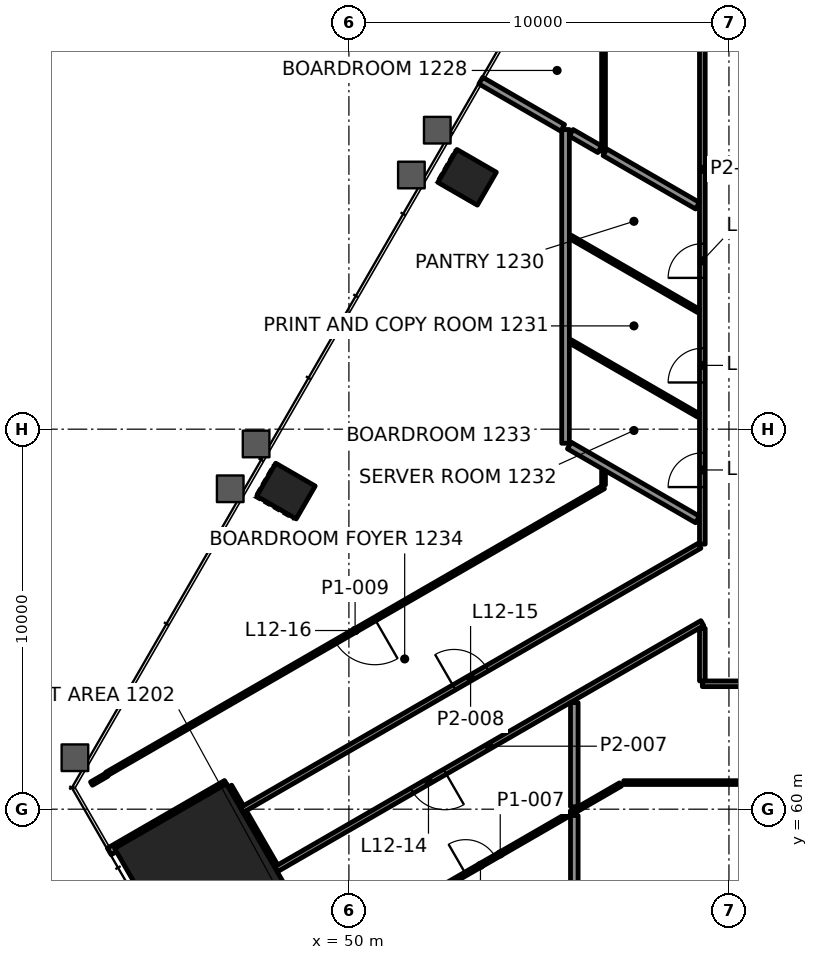
"""IFC4 building model, lengths in metres.
Left out: names, types, materials, properties, quantities, classifications, styles, units other than length and angle.
Written with IfcOpenShell. Run it as: python <this file> out.ifc"""

import sys

from ifc_helpers import new_model, si_unit, direction, frame, frame_2d, origin, origin_2d, place, context, subcontext, project, spatial, rectangle, extrude, element, fill, save


model = new_model("IFC4")
c1 = context("Model", 3, precision=1e-05, world=origin(), true_north=direction((0.0, 1.0)))
c2 = subcontext(c1, "Body", "Model", "MODEL_VIEW")
j1 = project(units=[si_unit("LENGTHUNIT", "METRE"), si_unit("PLANEANGLEUNIT", "RADIAN")], contexts=[c1])
p1 = place(None, origin())
s1 = spatial("IfcSite", under=j1, at=p1, CompositionType="ELEMENT")
p2 = place(p1, origin())
s2 = spatial("IfcBuilding", under=s1, at=p2, CompositionType="ELEMENT")
p3 = place(p2, frame((0.0, 0.0, 56.8)))
s3 = spatial("IfcBuildingStorey", under=s2, at=p3, CompositionType="ELEMENT", Elevation=56.8)
p4 = place(p3, frame((46.156, 58.347, 0.0), z_axis=(0.0, 0.0, 1.0), x_axis=(0.5, -0.866025403784, 0.0)))
e1 = element("IfcColumn", 1, at=p4, inside=s3, PredefinedType="COLUMN", context=c2, shape_type="SweptSolid", body=[
    extrude(rectangle(XDim=3.4, YDim=3.4, at=origin_2d()), origin(), (0.0, 0.0, 1.0), 4.2),
])
for number, where, z_axis, x_axis in (
    (2, (53.111, 76.628, -0.0), (0.0, 0.0, 1.0), (-0.5, -0.866, 0.0)),
    (3, (48.343, 68.371, -0.0), (0.0, 0.0, 1.0), (-0.5, -0.866, 0.0)),
):
    element("IfcColumn", number, at=place(p3, frame(where, z_axis=z_axis, x_axis=x_axis)), inside=s3, PredefinedType="COLUMN", context=c2, shape_type="SweptSolid", body=[
        extrude(rectangle(XDim=1.0, YDim=1.2, at=origin_2d()), origin(), (0.0, 0.0, 1.0), 4.2),
    ])
p5 = place(p3, frame((57.232, 60.7, 0.0), z_axis=(0.0, 0.0, 1.0), x_axis=(1.0, 0.0, 0.0)))
e4 = element("IfcWall", 4, at=p5, inside=s3, PredefinedType="PARTITIONING", context=c2, shape_type="SweptSolid", body=[
    extrude(rectangle(XDim=15.385, YDim=0.1, at=frame_2d((7.692, 0.0))), origin(), (0.0, 0.0, 1.0), 3.4),
])
p6 = place(p5, frame((7.192, 0.0, 0.0)))
e5 = element("IfcOpeningElement", 5, at=p6, cuts=e4, PredefinedType="OPENING", context=c2, shape_type="SweptSolid", body=[
    extrude(rectangle(XDim=1.0, YDim=2.1, at=frame_2d((0.5, 1.05))), frame((0.0, 0.06, 0.0), z_axis=(0.0, -1.0, 0.0), x_axis=(1.0, 0.0, 0.0)), (0.0, 0.0, 1.0), 0.12),
])
p7 = place(p3, frame((90.699, 63.3, 0.0), z_axis=(0.0, 0.0, 1.0), x_axis=(-1.0, 0.0, 0.0)))
e6 = element("IfcWall", 6, at=p7, inside=s3, PredefinedType="PARTITIONING", context=c2, shape_type="SweptSolid", body=[
    extrude(rectangle(XDim=31.399, YDim=0.15, at=frame_2d((15.7, 0.0))), origin(), (0.0, 0.0, 1.0), 3.4),
])
p8 = place(p7, frame((4.968, 0.0, 0.0)))
e7 = element("IfcOpeningElement", 7, at=p8, cuts=e6, PredefinedType="OPENING", context=c2, shape_type="SweptSolid", body=[
    extrude(rectangle(XDim=1.2, YDim=2.1, at=frame_2d((0.6, 1.05))), frame((0.0, 0.085, 0.0), z_axis=(0.0, -1.0, 0.0), x_axis=(1.0, 0.0, 0.0)), (0.0, 0.0, 1.0), 0.17),
])
p9 = place(p7, frame((13.908, 0.0, 0.0)))
e8 = element("IfcOpeningElement", 8, at=p9, cuts=e6, PredefinedType="OPENING", context=c2, shape_type="SweptSolid", body=[
    extrude(rectangle(XDim=1.2, YDim=2.1, at=frame_2d((0.6, 1.05))), frame((0.0, 0.085, 0.0), z_axis=(0.0, -1.0, 0.0), x_axis=(1.0, 0.0, 0.0)), (0.0, 0.0, 1.0), 0.17),
])
p10 = place(p7, frame((24.14, 0.0, 0.0)))
e9 = element("IfcOpeningElement", 9, at=p10, cuts=e6, PredefinedType="OPENING", context=c2, shape_type="SweptSolid", body=[
    extrude(rectangle(XDim=1.0, YDim=2.1, at=frame_2d((0.5, 1.05))), frame((0.0, 0.085, 0.0), z_axis=(0.0, -1.0, 0.0), x_axis=(1.0, 0.0, 0.0)), (0.0, 0.0, 1.0), 0.17),
])
p11 = place(p3, frame((50.819, 56.998, 0.0), z_axis=(0.0, 0.0, 1.0), x_axis=(0.866023631393, 0.50000306986, 0.0)))
e10 = element("IfcWall", 10, at=p11, inside=s3, PredefinedType="PARTITIONING", context=c2, shape_type="SweptSolid", body=[
    extrude(rectangle(XDim=7.305, YDim=0.1, at=frame_2d((3.653, 0.0))), origin(), (0.0, 0.0, 1.0), 3.4),
])
p12 = place(p11, frame((2.602, 0.0, 0.0)))
e11 = element("IfcOpeningElement", 11, at=p12, cuts=e10, PredefinedType="OPENING", context=c2, shape_type="SweptSolid", body=[
    extrude(rectangle(XDim=0.9, YDim=2.1, at=frame_2d((0.45, 1.05))), frame((0.0, 0.06, 0.0), z_axis=(0.0, -1.0, 0.0), x_axis=(1.0, 0.0, 0.0)), (0.0, 0.0, 1.0), 0.12),
])
p13 = place(p3, frame((59.3, 64.896, 0.0), z_axis=(0.0, 0.0, 1.0), x_axis=(-0.86602302899, -0.500004113243, 0.0)))
e12 = element("IfcWall", 12, at=p13, inside=s3, PredefinedType="PARTITIONING", context=c2, shape_type="SweptSolid", body=[
    extrude(rectangle(XDim=12.956, YDim=0.15, at=frame_2d((6.478, 0.0))), origin(), (0.0, 0.0, 1.0), 3.247),
])
p14 = place(p13, frame((7.821, 0.0, 0.0)))
e13 = element("IfcOpeningElement", 13, at=p14, cuts=e12, PredefinedType="OPENING", context=c2, shape_type="SweptSolid", body=[
    extrude(rectangle(XDim=1.0, YDim=2.1, at=frame_2d((0.5, 1.05))), frame((0.0, 0.085, 0.0), z_axis=(0.0, -1.0, 0.0), x_axis=(1.0, 0.0, 0.0)), (0.0, 0.0, 1.0), 0.17),
])
p15 = place(p3, frame((47.178, 59.976, 0.0), z_axis=(0.0, 0.0, 1.0), x_axis=(0.866019280802, 0.500010605167, 0.0)))
e14 = element("IfcWall", 14, at=p15, inside=s3, PredefinedType="PARTITIONING", context=c2, shape_type="SweptSolid", body=[
    extrude(rectangle(XDim=13.91, YDim=0.15, at=frame_2d((6.955, 0.0))), origin(), (0.0, 0.0, 1.0), 3.4),
])
p16 = place(p15, frame((6.455, 0.0, 0.0)))
e15 = element("IfcOpeningElement", 15, at=p16, cuts=e14, PredefinedType="OPENING", context=c2, shape_type="SweptSolid", body=[
    extrude(rectangle(XDim=1.0, YDim=2.1, at=frame_2d((0.5, 1.05))), frame((0.0, 0.085, 0.0), z_axis=(0.0, -1.0, 0.0), x_axis=(1.0, 0.0, 0.0)), (0.0, 0.0, 1.0), 0.17),
])
p17 = place(p3, frame((43.695, 58.888, 0.0), z_axis=(0.0, 0.0, 1.0), x_axis=(0.866031398331, 0.499989616998, 0.0)))
e16 = element("IfcWall", 16, at=p17, inside=s3, PredefinedType="PARTITIONING", context=c2, shape_type="SweptSolid", body=[
    extrude(rectangle(XDim=3.56, YDim=0.2, at=frame_2d((1.78, 0.0))), origin(), (0.0, 0.0, 1.0), 3.4),
])
p18 = place(p3, frame((43.226, 60.674, 0.0), z_axis=(0.0, 0.0, 1.0), x_axis=(0.866073792734, 0.499916178513, 0.0)))
e17 = element("IfcWall", 17, at=p18, inside=s3, PredefinedType="PARTITIONING", context=c2, shape_type="SweptSolid", body=[
    extrude(rectangle(XDim=0.473, YDim=0.1, at=frame_2d((0.236, 0.0))), origin(), (0.0, 0.0, 1.0), 3.4),
])
p19 = place(p3, frame((56.7, 68.476, 0.0), z_axis=(0.0, 0.0, 1.0), x_axis=(-0.866026152489, -0.499998703203, 0.0)))
e18 = element("IfcWall", 18, at=p19, inside=s3, PredefinedType="PARTITIONING", context=c2, shape_type="SweptSolid", body=[
    extrude(rectangle(XDim=15.096, YDim=0.1, at=frame_2d((7.548, 0.0))), origin(), (0.0, 0.0, 1.0), 3.4),
])
p20 = place(p19, frame((6.948, 0.0, 0.0)))
e19 = element("IfcOpeningElement", 19, at=p20, cuts=e18, PredefinedType="OPENING", context=c2, shape_type="SweptSolid", body=[
    extrude(rectangle(XDim=1.2, YDim=2.1, at=frame_2d((0.6, 1.05))), frame((0.0, 0.06, 0.0), z_axis=(0.0, -1.0, 0.0), x_axis=(1.0, 0.0, 0.0)), (0.0, 0.0, 1.0), 0.12),
])
p21 = place(p3, frame((59.3, 63.375, 0.0), z_axis=(0.0, 0.0, 1.0), x_axis=(0.0, 1.0, 0.0)))
e20 = element("IfcWall", 20, at=p21, inside=s3, PredefinedType="PARTITIONING", context=c2, shape_type="SweptSolid", body=[
    extrude(rectangle(XDim=1.385, YDim=0.15, at=frame_2d((0.692, 0.0))), origin(), (0.0, 0.0, 1.0), 3.247),
])
p22 = place(p3, frame((59.3, 66.975, 0.0), z_axis=(0.0, 0.0, 1.0), x_axis=(0.0, 1.0, 0.0)))
e21 = element("IfcWall", 21, at=p22, inside=s3, PredefinedType="PARTITIONING", context=c2, shape_type="SweptSolid", body=[
    extrude(rectangle(XDim=19.725, YDim=0.15, at=frame_2d((9.862, 0.0))), origin(), (0.0, 0.0, 1.0), 3.4),
])
p23 = place(p22, frame((1.502, 0.0, 0.0)))
e22 = element("IfcOpeningElement", 22, at=p23, cuts=e21, PredefinedType="OPENING", context=c2, shape_type="SweptSolid", body=[
    extrude(rectangle(XDim=0.9, YDim=2.1, at=frame_2d((0.45, 1.05))), frame((0.0, 0.085, 0.0), z_axis=(0.0, -1.0, 0.0), x_axis=(1.0, 0.0, 0.0)), (0.0, 0.0, 1.0), 0.17),
])
p24 = place(p22, frame((4.254, 0.0, 0.0)))
e23 = element("IfcOpeningElement", 23, at=p24, cuts=e21, PredefinedType="OPENING", context=c2, shape_type="SweptSolid", body=[
    extrude(rectangle(XDim=0.9, YDim=2.1, at=frame_2d((0.45, 1.05))), frame((0.0, 0.085, 0.0), z_axis=(0.0, -1.0, 0.0), x_axis=(1.0, 0.0, 0.0)), (0.0, 0.0, 1.0), 0.17),
])
p25 = place(p22, frame((7.007, 0.0, 0.0)))
e24 = element("IfcOpeningElement", 24, at=p25, cuts=e21, PredefinedType="OPENING", context=c2, shape_type="SweptSolid", body=[
    extrude(rectangle(XDim=0.9, YDim=2.1, at=frame_2d((0.45, 1.05))), frame((0.0, 0.085, 0.0), z_axis=(0.0, -1.0, 0.0), x_axis=(1.0, 0.0, 0.0)), (0.0, 0.0, 1.0), 0.17),
])
p26 = place(p3, frame((56.7, 68.534, 0.0), z_axis=(0.0, 0.0, 1.0), x_axis=(0.0, 1.0, 0.0)))
e25 = element("IfcWall", 25, at=p26, inside=s3, PredefinedType="PARTITIONING", context=c2, shape_type="SweptSolid", body=[
    extrude(rectangle(XDim=0.372, YDim=0.1, at=frame_2d((0.186, 0.0))), origin(), (0.0, 0.0, 1.0), 3.4),
])
p27 = place(p3, frame((56.7, 84.046, 0.0), z_axis=(0.0, 0.0, 1.0), x_axis=(0.0, -1.0, 0.0)))
e26 = element("IfcWall", 26, at=p27, inside=s3, PredefinedType="PARTITIONING", context=c2, shape_type="SweptSolid", body=[
    extrude(rectangle(XDim=6.737, YDim=0.1, at=frame_2d((3.369, 0.0))), origin(), (0.0, 0.0, 1.0), 3.165),
])
p28 = place(p27, frame((2.769, 0.0, 0.0)))
e27 = element("IfcOpeningElement", 27, at=p28, cuts=e26, PredefinedType="OPENING", context=c2, shape_type="SweptSolid", body=[
    extrude(rectangle(XDim=1.2, YDim=2.1, at=frame_2d((0.6, 1.05))), frame((0.0, 0.06, 0.0), z_axis=(0.0, -1.0, 0.0), x_axis=(1.0, 0.0, 0.0)), (0.0, 0.0, 1.0), 0.12),
])
p29 = place(p3, frame((55.931, 55.829, 0.0), z_axis=(0.0, 0.0, 1.0), x_axis=(0.0, 1.0, 0.0)))
e28 = element("IfcWall", 28, at=p29, inside=s3, PredefinedType="PARTITIONING", context=c2, shape_type="SweptSolid", body=[
    extrude(rectangle(XDim=4.005, YDim=0.2, at=frame_2d((2.002, 0.0))), origin(), (0.0, 0.0, 1.0), 3.4),
])
p30 = place(p3, frame((55.7, 69.63, 0.0), z_axis=(0.0, 0.0, 1.0), x_axis=(0.0, 1.0, 0.0)))
e29 = element("IfcWall", 29, at=p30, inside=s3, PredefinedType="PARTITIONING", context=c2, shape_type="SweptSolid", body=[
    extrude(rectangle(XDim=8.256, YDim=0.2, at=frame_2d((4.128, 0.0))), origin(), (0.0, 0.0, 1.0), 3.4),
])
p31 = place(p3, frame((48.039, 58.485, 0.0), z_axis=(0.0, 0.0, 1.0), x_axis=(-0.499949127178, 0.86605477323, 0.0)))
e30 = element("IfcWall", 30, at=p31, inside=s3, PredefinedType="PARTITIONING", context=c2, shape_type="SweptSolid", body=[
    extrude(rectangle(XDim=1.647, YDim=0.2, at=frame_2d((0.824, 0.0))), origin(), (0.0, 0.0, 1.0), 3.247),
])
p32 = place(p3, frame((59.173, 75.881, 0.0), z_axis=(0.0, 0.0, 1.0), x_axis=(-0.866049697453, 0.499957919771, 0.0)))
e31 = element("IfcWall", 31, at=p32, inside=s3, PredefinedType="PARTITIONING", context=c2, shape_type="SweptSolid", body=[
    extrude(rectangle(XDim=2.812, YDim=0.2, at=frame_2d((1.406, 0.0))), origin(), (0.0, 0.0, 1.0), 3.4),
])
p33 = place(p3, frame((59.199, 73.113, 0.0), z_axis=(0.0, 0.0, 1.0), x_axis=(-0.866016482536, 0.500015451737, 0.0)))
e32 = element("IfcWall", 32, at=p33, inside=s3, PredefinedType="PARTITIONING", context=c2, shape_type="SweptSolid", body=[
    extrude(rectangle(XDim=3.895, YDim=0.1, at=frame_2d((1.948, 0.0))), origin(), (0.0, 0.0, 1.0), 3.4),
])
p34 = place(p3, frame((59.199, 70.361, 0.0), z_axis=(0.0, 0.0, 1.0), x_axis=(-0.866043624834, 0.499968438888, 0.0)))
e33 = element("IfcWall", 33, at=p34, inside=s3, PredefinedType="PARTITIONING", context=c2, shape_type="SweptSolid", body=[
    extrude(rectangle(XDim=3.895, YDim=0.1, at=frame_2d((1.947, 0.0))), origin(), (0.0, 0.0, 1.0), 3.4),
])
p35 = place(p3, frame((59.173, 67.623, 0.0), z_axis=(0.0, 0.0, 1.0), x_axis=(-0.866000809756, 0.500042595688, 0.0)))
e34 = element("IfcWall", 34, at=p35, inside=s3, PredefinedType="PARTITIONING", context=c2, shape_type="SweptSolid", body=[
    extrude(rectangle(XDim=3.895, YDim=0.2, at=frame_2d((1.947, 0.0))), origin(), (0.0, 0.0, 1.0), 3.4),
])
p36 = place(p3, frame((55.931, 60.065, 0.0), z_axis=(0.0, 0.0, 1.0), x_axis=(0.0, 1.0, 0.0)))
e35 = element("IfcWall", 35, at=p36, inside=s3, PredefinedType="PARTITIONING", context=c2, shape_type="SweptSolid", body=[
    extrude(rectangle(XDim=2.74, YDim=0.2, at=frame_2d((1.37, 0.0))), origin(), (0.0, 0.0, 1.0), 3.4),
])
p37 = place(p3, frame((47.14, 60.041, 0.0), z_axis=(0.0, 0.0, 1.0), x_axis=(-0.500049599607, 0.865996765544, 0.0)))
e36 = element("IfcWall", 36, at=p37, inside=s3, PredefinedType="PARTITIONING", context=c2, shape_type="SweptSolid", body=[
    extrude(rectangle(XDim=0.625, YDim=0.2, at=frame_2d((0.312, 0.0))), origin(), (0.0, 0.0, 1.0), 3.4),
])
p38 = place(p3, frame((56.6, 77.366, 0.0), z_axis=(0.0, 0.0, 1.0), x_axis=(-0.866101087359, 0.499868889286, 0.0)))
e37 = element("IfcWall", 37, at=p38, inside=s3, PredefinedType="PARTITIONING", context=c2, shape_type="SweptSolid", body=[
    extrude(rectangle(XDim=0.866, YDim=0.2, at=frame_2d((0.433, 0.0))), origin(), (0.0, 0.0, 1.0), 3.4),
])
p39 = place(p3, frame((55.625, 77.929, 0.0), z_axis=(0.0, 0.0, 1.0), x_axis=(-0.86602376425, 0.500002839747, 0.0)))
e38 = element("IfcWall", 38, at=p39, inside=s3, PredefinedType="PARTITIONING", context=c2, shape_type="SweptSolid", body=[
    extrude(rectangle(XDim=2.487, YDim=0.2, at=frame_2d((1.244, 0.0))), origin(), (0.0, 0.0, 1.0), 3.165),
])
p40 = place(p12, origin())
e39 = element("IfcDoor", 39, at=p40, inside=s3, OperationType="SINGLE_SWING_RIGHT", PredefinedType="DOOR", context=c2, shape_type="SweptSolid", body=[
    extrude(rectangle(XDim=0.9, YDim=2.1, at=frame_2d((0.45, 1.05))), frame((0.0, 0.025, 0.0), z_axis=(0.0, -1.0, 0.0), x_axis=(1.0, 0.0, 0.0)), (0.0, 0.0, 1.0), 0.05),
])
fill(e11, e39)
p41 = place(p14, origin())
e40 = element("IfcDoor", 40, at=p41, inside=s3, OperationType="SINGLE_SWING_RIGHT", PredefinedType="DOOR", context=c2, shape_type="SweptSolid", body=[
    extrude(rectangle(XDim=1.0, YDim=2.1, at=frame_2d((0.5, 1.05))), frame((0.0, 0.025, 0.0), z_axis=(0.0, -1.0, 0.0), x_axis=(1.0, 0.0, 0.0)), (0.0, 0.0, 1.0), 0.05),
])
fill(e13, e40)
p42 = place(p16, origin())
e41 = element("IfcDoor", 41, at=p42, inside=s3, OperationType="SINGLE_SWING_LEFT", PredefinedType="DOOR", context=c2, shape_type="SweptSolid", body=[
    extrude(rectangle(XDim=1.0, YDim=2.1, at=frame_2d((0.5, 1.05))), frame((0.0, 0.025, 0.0), z_axis=(0.0, -1.0, 0.0), x_axis=(1.0, 0.0, 0.0)), (0.0, 0.0, 1.0), 0.05),
])
fill(e15, e41)
p43 = place(p20, origin())
e42 = element("IfcDoor", 42, at=p43, inside=s3, OperationType="DOUBLE_DOOR_SINGLE_SWING", PredefinedType="DOOR", context=c2, shape_type="SweptSolid", body=[
    extrude(rectangle(XDim=1.2, YDim=2.1, at=frame_2d((0.6, 1.05))), frame((0.0, 0.025, 0.0), z_axis=(0.0, -1.0, 0.0), x_axis=(1.0, 0.0, 0.0)), (0.0, 0.0, 1.0), 0.05),
])
fill(e19, e42)
p44 = place(p23, origin())
e43 = element("IfcDoor", 43, at=p44, inside=s3, OperationType="SINGLE_SWING_LEFT", PredefinedType="DOOR", context=c2, shape_type="SweptSolid", body=[
    extrude(rectangle(XDim=0.9, YDim=2.1, at=frame_2d((0.45, 1.05))), frame((0.0, 0.025, 0.0), z_axis=(0.0, -1.0, 0.0), x_axis=(1.0, 0.0, 0.0)), (0.0, 0.0, 1.0), 0.05),
])
fill(e22, e43)
p45 = place(p24, origin())
e44 = element("IfcDoor", 44, at=p45, inside=s3, OperationType="SINGLE_SWING_RIGHT", PredefinedType="DOOR", context=c2, shape_type="SweptSolid", body=[
    extrude(rectangle(XDim=0.9, YDim=2.1, at=frame_2d((0.45, 1.05))), frame((0.0, 0.025, 0.0), z_axis=(0.0, -1.0, 0.0), x_axis=(1.0, 0.0, 0.0)), (0.0, 0.0, 1.0), 0.05),
])
fill(e23, e44)
p46 = place(p25, origin())
e45 = element("IfcDoor", 45, at=p46, inside=s3, OperationType="SINGLE_SWING_LEFT", PredefinedType="DOOR", context=c2, shape_type="SweptSolid", body=[
    extrude(rectangle(XDim=0.9, YDim=2.1, at=frame_2d((0.45, 1.05))), frame((0.0, 0.025, 0.0), z_axis=(0.0, -1.0, 0.0), x_axis=(1.0, 0.0, 0.0)), (0.0, 0.0, 1.0), 0.05),
])
fill(e24, e45)
save(model, sys.argv[1])
